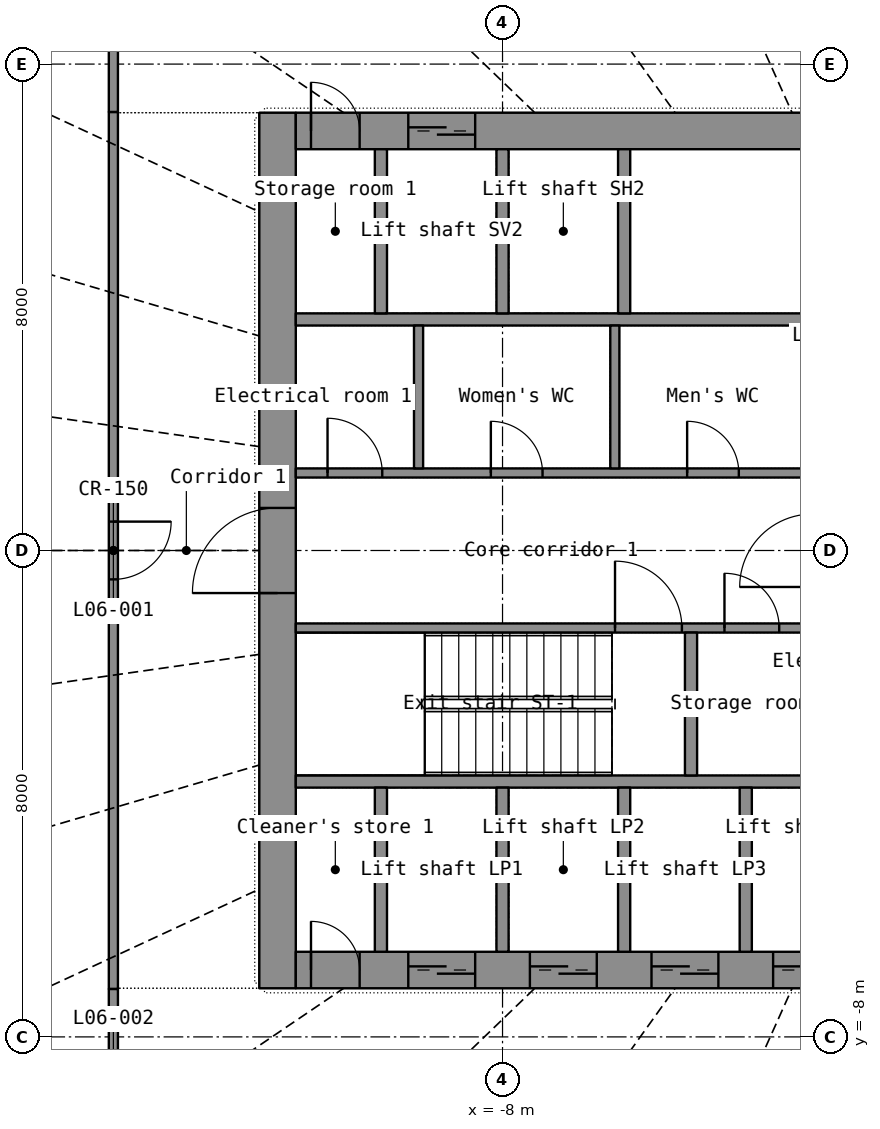
"""IFC4 building model, lengths in metres.
Left out: names, types, materials, properties, quantities, classifications, styles, units other than length and angle.
Written with IfcOpenShell. Run it as: python <this file> out.ifc"""

import sys

from ifc_helpers import new_model, si_unit, direction, frame, frame_2d, origin, place, context, subcontext, project, spatial, rectangle, extrude, element, fill, save


model = new_model("IFC4")
c1 = context("Model", 3, precision=1e-05, world=origin(), true_north=direction((0.0, 1.0)))
c2 = subcontext(c1, "Body", "Model", "MODEL_VIEW")
j1 = project(units=[si_unit("LENGTHUNIT", "METRE"), si_unit("PLANEANGLEUNIT", "RADIAN")], contexts=[c1])
p1 = place(None, origin())
s1 = spatial("IfcSite", under=j1, at=p1, CompositionType="ELEMENT")
p2 = place(p1, origin())
s2 = spatial("IfcBuilding", under=s1, at=p2, CompositionType="ELEMENT")
p3 = place(p2, frame((0.0, 0.0, 32.9)))
s3 = spatial("IfcBuildingStorey", under=s2, at=p3, CompositionType="ELEMENT", Elevation=32.9)
p4 = place(p3, frame((-11.7, -7.2, 0.0), z_axis=(0.0, 0.0, 1.0), x_axis=(0.0, 1.0, 0.0)))
e1 = element("IfcWall", 1, at=p4, inside=s3, PredefinedType="SHEAR", context=c2, shape_type="SweptSolid", body=[
    extrude(rectangle(XDim=14.4, YDim=0.6, at=frame_2d((7.2, 0.0))), origin(), (0.0, 0.0, 1.0), 3.8),
])
p5 = place(p4, frame((6.5, 0.0, 0.0)))
e2 = element("IfcOpeningElement", 2, at=p5, cuts=e1, PredefinedType="OPENING", context=c2, shape_type="SweptSolid", body=[
    extrude(rectangle(XDim=1.4, YDim=2.2, at=frame_2d((0.7, 1.1))), frame((0.0, 0.31, 0.0), z_axis=(0.0, -1.0, 0.0), x_axis=(1.0, 0.0, 0.0)), (0.0, 0.0, 1.0), 0.62),
])
p6 = place(p3, frame((-11.4, -6.9, 0.0), z_axis=(0.0, 0.0, 1.0), x_axis=(1.0, 0.0, 0.0)))
e3 = element("IfcWall", 3, at=p6, inside=s3, PredefinedType="SHEAR", context=c2, shape_type="SweptSolid", body=[
    extrude(rectangle(XDim=22.8, YDim=0.6, at=frame_2d((11.4, 0.0))), origin(), (0.0, 0.0, 1.0), 3.8),
])
p7 = place(p6, frame((1.85, 0.0, 0.0)))
e4 = element("IfcOpeningElement", 4, at=p7, cuts=e3, PredefinedType="OPENING", context=c2, shape_type="SweptSolid", body=[
    extrude(rectangle(XDim=1.1, YDim=2.2, at=frame_2d((0.55, 1.1))), frame((0.0, 0.31, 0.0), z_axis=(0.0, -1.0, 0.0), x_axis=(1.0, 0.0, 0.0)), (0.0, 0.0, 1.0), 0.62),
])
p8 = place(p6, frame((3.85, 0.0, 0.0)))
e5 = element("IfcOpeningElement", 5, at=p8, cuts=e3, PredefinedType="OPENING", context=c2, shape_type="SweptSolid", body=[
    extrude(rectangle(XDim=1.1, YDim=2.2, at=frame_2d((0.55, 1.1))), frame((0.0, 0.31, 0.0), z_axis=(0.0, -1.0, 0.0), x_axis=(1.0, 0.0, 0.0)), (0.0, 0.0, 1.0), 0.62),
])
p9 = place(p6, frame((5.85, 0.0, 0.0)))
e6 = element("IfcOpeningElement", 6, at=p9, cuts=e3, PredefinedType="OPENING", context=c2, shape_type="SweptSolid", body=[
    extrude(rectangle(XDim=1.1, YDim=2.2, at=frame_2d((0.55, 1.1))), frame((0.0, 0.31, 0.0), z_axis=(0.0, -1.0, 0.0), x_axis=(1.0, 0.0, 0.0)), (0.0, 0.0, 1.0), 0.62),
])
p10 = place(p6, frame((7.85, 0.0, 0.0)))
e7 = element("IfcOpeningElement", 7, at=p10, cuts=e3, PredefinedType="OPENING", context=c2, shape_type="SweptSolid", body=[
    extrude(rectangle(XDim=1.1, YDim=2.2, at=frame_2d((0.55, 1.1))), frame((0.0, 0.31, 0.0), z_axis=(0.0, -1.0, 0.0), x_axis=(1.0, 0.0, 0.0)), (0.0, 0.0, 1.0), 0.62),
])
p11 = place(p6, frame((9.85, 0.0, 0.0)))
e8 = element("IfcOpeningElement", 8, at=p11, cuts=e3, PredefinedType="OPENING", context=c2, shape_type="SweptSolid", body=[
    extrude(rectangle(XDim=1.1, YDim=2.2, at=frame_2d((0.55, 1.1))), frame((0.0, 0.31, 0.0), z_axis=(0.0, -1.0, 0.0), x_axis=(1.0, 0.0, 0.0)), (0.0, 0.0, 1.0), 0.62),
])
p12 = place(p6, frame((11.85, 0.0, 0.0)))
e9 = element("IfcOpeningElement", 9, at=p12, cuts=e3, PredefinedType="OPENING", context=c2, shape_type="SweptSolid", body=[
    extrude(rectangle(XDim=1.1, YDim=2.2, at=frame_2d((0.55, 1.1))), frame((0.0, 0.31, 0.0), z_axis=(0.0, -1.0, 0.0), x_axis=(1.0, 0.0, 0.0)), (0.0, 0.0, 1.0), 0.62),
])
p13 = place(p6, frame((13.85, 0.0, 0.0)))
e10 = element("IfcOpeningElement", 10, at=p13, cuts=e3, PredefinedType="OPENING", context=c2, shape_type="SweptSolid", body=[
    extrude(rectangle(XDim=1.1, YDim=2.2, at=frame_2d((0.55, 1.1))), frame((0.0, 0.31, 0.0), z_axis=(0.0, -1.0, 0.0), x_axis=(1.0, 0.0, 0.0)), (0.0, 0.0, 1.0), 0.62),
])
p14 = place(p6, frame((15.85, 0.0, 0.0)))
e11 = element("IfcOpeningElement", 11, at=p14, cuts=e3, PredefinedType="OPENING", context=c2, shape_type="SweptSolid", body=[
    extrude(rectangle(XDim=1.1, YDim=2.2, at=frame_2d((0.55, 1.1))), frame((0.0, 0.31, 0.0), z_axis=(0.0, -1.0, 0.0), x_axis=(1.0, 0.0, 0.0)), (0.0, 0.0, 1.0), 0.62),
])
p15 = place(p6, frame((19.85, 0.0, 0.0)))
e12 = element("IfcOpeningElement", 12, at=p15, cuts=e3, PredefinedType="OPENING", context=c2, shape_type="SweptSolid", body=[
    extrude(rectangle(XDim=1.1, YDim=2.2, at=frame_2d((0.55, 1.1))), frame((0.0, 0.31, 0.0), z_axis=(0.0, -1.0, 0.0), x_axis=(1.0, 0.0, 0.0)), (0.0, 0.0, 1.0), 0.62),
])
p16 = place(p6, frame((0.25, 0.0, 0.0)))
e13 = element("IfcOpeningElement", 13, at=p16, cuts=e3, PredefinedType="OPENING", context=c2, shape_type="SweptSolid", body=[
    extrude(rectangle(XDim=0.8, YDim=2.05, at=frame_2d((0.4, 1.025))), frame((0.0, 0.31, 0.0), z_axis=(0.0, -1.0, 0.0), x_axis=(1.0, 0.0, 0.0)), (0.0, 0.0, 1.0), 0.62),
])
p17 = place(p6, frame((21.75, 0.0, 0.0)))
e14 = element("IfcOpeningElement", 14, at=p17, cuts=e3, PredefinedType="OPENING", context=c2, shape_type="SweptSolid", body=[
    extrude(rectangle(XDim=0.8, YDim=2.05, at=frame_2d((0.4, 1.025))), frame((0.0, 0.31, 0.0), z_axis=(0.0, -1.0, 0.0), x_axis=(1.0, 0.0, 0.0)), (0.0, 0.0, 1.0), 0.62),
])
p18 = place(p3, frame((-11.4, 6.9, 0.0), z_axis=(0.0, 0.0, 1.0), x_axis=(1.0, 0.0, 0.0)))
e15 = element("IfcWall", 15, at=p18, inside=s3, PredefinedType="SHEAR", context=c2, shape_type="SweptSolid", body=[
    extrude(rectangle(XDim=22.8, YDim=0.6, at=frame_2d((11.4, 0.0))), origin(), (0.0, 0.0, 1.0), 3.8),
])
p19 = place(p18, frame((1.85, 0.0, 0.0)))
e16 = element("IfcOpeningElement", 16, at=p19, cuts=e15, PredefinedType="OPENING", context=c2, shape_type="SweptSolid", body=[
    extrude(rectangle(XDim=1.1, YDim=2.2, at=frame_2d((0.55, 1.1))), frame((0.0, 0.31, 0.0), z_axis=(0.0, -1.0, 0.0), x_axis=(1.0, 0.0, 0.0)), (0.0, 0.0, 1.0), 0.62),
])
p20 = place(p18, frame((8.95, 0.0, 0.0)))
e17 = element("IfcOpeningElement", 17, at=p20, cuts=e15, PredefinedType="OPENING", context=c2, shape_type="SweptSolid", body=[
    extrude(rectangle(XDim=0.9, YDim=2.1, at=frame_2d((0.45, 1.05))), frame((0.0, 0.31, 0.0), z_axis=(0.0, -1.0, 0.0), x_axis=(1.0, 0.0, 0.0)), (0.0, 0.0, 1.0), 0.62),
])
p21 = place(p18, frame((16.95, 0.0, 0.0)))
e18 = element("IfcOpeningElement", 18, at=p21, cuts=e15, PredefinedType="OPENING", context=c2, shape_type="SweptSolid", body=[
    extrude(rectangle(XDim=0.9, YDim=2.1, at=frame_2d((0.45, 1.05))), frame((0.0, 0.31, 0.0), z_axis=(0.0, -1.0, 0.0), x_axis=(1.0, 0.0, 0.0)), (0.0, 0.0, 1.0), 0.62),
])
p22 = place(p18, frame((0.25, 0.0, 0.0)))
e19 = element("IfcOpeningElement", 19, at=p22, cuts=e15, PredefinedType="OPENING", context=c2, shape_type="SweptSolid", body=[
    extrude(rectangle(XDim=0.8, YDim=2.05, at=frame_2d((0.4, 1.025))), frame((0.0, 0.31, 0.0), z_axis=(0.0, -1.0, 0.0), x_axis=(1.0, 0.0, 0.0)), (0.0, 0.0, 1.0), 0.62),
])
p23 = place(p18, frame((21.75, 0.0, 0.0)))
e20 = element("IfcOpeningElement", 20, at=p23, cuts=e15, PredefinedType="OPENING", context=c2, shape_type="SweptSolid", body=[
    extrude(rectangle(XDim=0.8, YDim=2.05, at=frame_2d((0.4, 1.025))), frame((0.0, 0.31, 0.0), z_axis=(0.0, -1.0, 0.0), x_axis=(1.0, 0.0, 0.0)), (0.0, 0.0, 1.0), 0.62),
])
for number, where, z_axis, x_axis in (
    (21, (-11.4, -3.8, 0.0), (0.0, 0.0, 1.0), (1.0, 0.0, 0.0)),
    (22, (-11.4, 3.8, 0.0), (0.0, 0.0, 1.0), (1.0, 0.0, 0.0)),
):
    element("IfcWall", number, at=place(p3, frame(where, z_axis=z_axis, x_axis=x_axis)), inside=s3, PredefinedType="SHEAR", context=c2, shape_type="SweptSolid", body=[
        extrude(rectangle(XDim=22.8, YDim=0.2, at=frame_2d((11.4, 0.0))), origin(), (0.0, 0.0, 1.0), 3.8),
    ])
for number, where, z_axis, x_axis in (
    (23, (-10.0, -6.6, 0.0), (0.0, 0.0, 1.0), (0.0, 1.0, 0.0)),
    (24, (-8.0, -6.6, 0.0), (0.0, 0.0, 1.0), (0.0, 1.0, 0.0)),
    (25, (-6.0, -6.6, 0.0), (0.0, 0.0, 1.0), (0.0, 1.0, 0.0)),
    (26, (-4.0, -6.6, 0.0), (0.0, 0.0, 1.0), (0.0, 1.0, 0.0)),
    (27, (-10.0, 3.9, 0.0), (0.0, 0.0, 1.0), (0.0, 1.0, 0.0)),
    (28, (-8.0, 3.9, 0.0), (0.0, 0.0, 1.0), (0.0, 1.0, 0.0)),
    (29, (-6.0, 3.9, 0.0), (0.0, 0.0, 1.0), (0.0, 1.0, 0.0)),
):
    element("IfcWall", number, at=place(p3, frame(where, z_axis=z_axis, x_axis=x_axis)), inside=s3, PredefinedType="SHEAR", context=c2, shape_type="SweptSolid", body=[
        extrude(rectangle(XDim=2.7, YDim=0.2, at=frame_2d((1.35, 0.0))), origin(), (0.0, 0.0, 1.0), 3.8),
    ])
p24 = place(p3, frame((-11.4, -1.275, 0.0), z_axis=(0.0, 0.0, 1.0), x_axis=(1.0, 0.0, 0.0)))
e30 = element("IfcWall", 30, at=p24, inside=s3, PredefinedType="SHEAR", context=c2, shape_type="SweptSolid", body=[
    extrude(rectangle(XDim=8.4, YDim=0.15, at=frame_2d((4.2, 0.0))), origin(), (0.0, 0.0, 1.0), 3.8),
])
p25 = place(p24, frame((5.25, 0.0, 0.0)))
e31 = element("IfcOpeningElement", 31, at=p25, cuts=e30, PredefinedType="OPENING", context=c2, shape_type="SweptSolid", body=[
    extrude(rectangle(XDim=1.1, YDim=2.15, at=frame_2d((0.55, 1.075))), frame((0.0, 0.085, 0.0), z_axis=(0.0, -1.0, 0.0), x_axis=(1.0, 0.0, 0.0)), (0.0, 0.0, 1.0), 0.17),
])
p26 = place(p24, frame((7.05, 0.0, 0.0)))
e32 = element("IfcOpeningElement", 32, at=p26, cuts=e30, PredefinedType="OPENING", context=c2, shape_type="SweptSolid", body=[
    extrude(rectangle(XDim=0.9, YDim=2.1, at=frame_2d((0.45, 1.05))), frame((0.0, 0.085, 0.0), z_axis=(0.0, -1.0, 0.0), x_axis=(1.0, 0.0, 0.0)), (0.0, 0.0, 1.0), 0.17),
])
p27 = place(p3, frame((-11.4, 1.275, 0.0), z_axis=(0.0, 0.0, 1.0), x_axis=(1.0, 0.0, 0.0)))
e33 = element("IfcWall", 33, at=p27, inside=s3, PredefinedType="PARTITIONING", context=c2, shape_type="SweptSolid", body=[
    extrude(rectangle(XDim=8.4, YDim=0.15, at=frame_2d((4.2, 0.0))), origin(), (0.0, 0.0, 1.0), 3.8),
])
p28 = place(p27, frame((0.522, 0.0, 0.0)))
e34 = element("IfcOpeningElement", 34, at=p28, cuts=e33, PredefinedType="OPENING", context=c2, shape_type="SweptSolid", body=[
    extrude(rectangle(XDim=0.9, YDim=2.1, at=frame_2d((0.45, 1.05))), frame((0.0, 0.085, 0.0), z_axis=(0.0, -1.0, 0.0), x_axis=(1.0, 0.0, 0.0)), (0.0, 0.0, 1.0), 0.17),
])
p29 = place(p27, frame((3.208, 0.0, 0.0)))
e35 = element("IfcOpeningElement", 35, at=p29, cuts=e33, PredefinedType="OPENING", context=c2, shape_type="SweptSolid", body=[
    extrude(rectangle(XDim=0.85, YDim=2.1, at=frame_2d((0.425, 1.05))), frame((0.0, 0.085, 0.0), z_axis=(0.0, -1.0, 0.0), x_axis=(1.0, 0.0, 0.0)), (0.0, 0.0, 1.0), 0.17),
])
p30 = place(p27, frame((6.436, 0.0, 0.0)))
e36 = element("IfcOpeningElement", 36, at=p30, cuts=e33, PredefinedType="OPENING", context=c2, shape_type="SweptSolid", body=[
    extrude(rectangle(XDim=0.85, YDim=2.1, at=frame_2d((0.425, 1.05))), frame((0.0, 0.085, 0.0), z_axis=(0.0, -1.0, 0.0), x_axis=(1.0, 0.0, 0.0)), (0.0, 0.0, 1.0), 0.17),
])
p31 = place(p3, frame((-4.9, -3.7, 0.0), z_axis=(0.0, 0.0, 1.0), x_axis=(0.0, 1.0, 0.0)))
e37 = element("IfcWall", 37, at=p31, inside=s3, PredefinedType="SHEAR", context=c2, shape_type="SweptSolid", body=[
    extrude(rectangle(XDim=2.35, YDim=0.2, at=frame_2d((1.175, 0.0))), origin(), (0.0, 0.0, 1.0), 3.8),
])
for number, where, z_axis, x_axis in (
    (38, (-9.381, 1.35, 0.0), (0.0, 0.0, 1.0), (0.0, 1.0, 0.0)),
    (39, (-6.153, 1.35, 0.0), (0.0, 0.0, 1.0), (0.0, 1.0, 0.0)),
):
    element("IfcWall", number, at=place(p3, frame(where, z_axis=z_axis, x_axis=x_axis)), inside=s3, PredefinedType="PARTITIONING", context=c2, shape_type="SweptSolid", body=[
        extrude(rectangle(XDim=2.35, YDim=0.15, at=frame_2d((1.175, 0.0))), origin(), (0.0, 0.0, 1.0), 3.8),
    ])
p32 = place(p3, frame((-14.4, 7.212, 0.0), z_axis=(0.0, 0.0, 1.0), x_axis=(0.0, -1.0, 0.0)))
e40 = element("IfcWall", 40, at=p32, inside=s3, PredefinedType="PARTITIONING", context=c2, shape_type="SweptSolid", body=[
    extrude(rectangle(XDim=14.424, YDim=0.15, at=frame_2d((7.212, 0.0))), origin(), (0.0, 0.0, 1.0), 2.8),
])
p33 = place(p32, frame((6.737, 0.0, 0.0)))
e41 = element("IfcOpeningElement", 41, at=p33, cuts=e40, PredefinedType="OPENING", context=c2, shape_type="SweptSolid", body=[
    extrude(rectangle(XDim=0.95, YDim=2.15, at=frame_2d((0.475, 1.075))), frame((0.0, 0.085, 0.0), z_axis=(0.0, -1.0, 0.0), x_axis=(1.0, 0.0, 0.0)), (0.0, 0.0, 1.0), 0.17),
])
p34 = place(p3, frame((-14.4, -7.213, 0.0), z_axis=(0.0, 0.0, 1.0), x_axis=(0.0, -1.0, 0.0)))
e42 = element("IfcWall", 42, at=p34, inside=s3, PredefinedType="PARTITIONING", context=c2, shape_type="SweptSolid", body=[
    extrude(rectangle(XDim=2.986, YDim=0.15, at=frame_2d((1.493, 0.0))), origin(), (0.0, 0.0, 1.0), 2.8),
])
p35 = place(p34, frame((1.018, 0.0, 0.0)))
e43 = element("IfcOpeningElement", 43, at=p35, cuts=e42, PredefinedType="OPENING", context=c2, shape_type="SweptSolid", body=[
    extrude(rectangle(XDim=0.95, YDim=2.15, at=frame_2d((0.475, 1.075))), frame((0.0, 0.085, 0.0), z_axis=(0.0, -1.0, 0.0), x_axis=(1.0, 0.0, 0.0)), (0.0, 0.0, 1.0), 0.17),
])
p36 = place(p3, frame((-14.4, 10.199, 0.0), z_axis=(0.0, 0.0, 1.0), x_axis=(0.0, -1.0, 0.0)))
e44 = element("IfcWall", 44, at=p36, inside=s3, PredefinedType="PARTITIONING", context=c2, shape_type="SweptSolid", body=[
    extrude(rectangle(XDim=2.986, YDim=0.15, at=frame_2d((1.493, 0.0))), origin(), (0.0, 0.0, 1.0), 2.8),
])
p37 = place(p7, origin())
e45 = element("IfcDoor", 45, at=p37, inside=s3, OperationType="DOUBLE_DOOR_SLIDING", PredefinedType="DOOR", context=c2, shape_type="SweptSolid", body=[
    extrude(rectangle(XDim=1.1, YDim=2.2, at=frame_2d((0.55, 1.1))), frame((0.0, 0.025, 0.0), z_axis=(0.0, -1.0, 0.0), x_axis=(1.0, 0.0, 0.0)), (0.0, 0.0, 1.0), 0.05),
])
fill(e4, e45)
p38 = place(p8, origin())
e46 = element("IfcDoor", 46, at=p38, inside=s3, OperationType="DOUBLE_DOOR_SLIDING", PredefinedType="DOOR", context=c2, shape_type="SweptSolid", body=[
    extrude(rectangle(XDim=1.1, YDim=2.2, at=frame_2d((0.55, 1.1))), frame((0.0, 0.025, 0.0), z_axis=(0.0, -1.0, 0.0), x_axis=(1.0, 0.0, 0.0)), (0.0, 0.0, 1.0), 0.05),
])
fill(e5, e46)
p39 = place(p9, origin())
e47 = element("IfcDoor", 47, at=p39, inside=s3, OperationType="DOUBLE_DOOR_SLIDING", PredefinedType="DOOR", context=c2, shape_type="SweptSolid", body=[
    extrude(rectangle(XDim=1.1, YDim=2.2, at=frame_2d((0.55, 1.1))), frame((0.0, 0.025, 0.0), z_axis=(0.0, -1.0, 0.0), x_axis=(1.0, 0.0, 0.0)), (0.0, 0.0, 1.0), 0.05),
])
fill(e6, e47)
p40 = place(p10, origin())
e48 = element("IfcDoor", 48, at=p40, inside=s3, OperationType="DOUBLE_DOOR_SLIDING", PredefinedType="DOOR", context=c2, shape_type="SweptSolid", body=[
    extrude(rectangle(XDim=1.1, YDim=2.2, at=frame_2d((0.55, 1.1))), frame((0.0, 0.025, 0.0), z_axis=(0.0, -1.0, 0.0), x_axis=(1.0, 0.0, 0.0)), (0.0, 0.0, 1.0), 0.05),
])
fill(e7, e48)
p41 = place(p16, origin())
e49 = element("IfcDoor", 49, at=p41, inside=s3, OperationType="SINGLE_SWING_LEFT", PredefinedType="DOOR", context=c2, shape_type="SweptSolid", body=[
    extrude(rectangle(XDim=0.8, YDim=2.05, at=frame_2d((0.4, 1.025))), frame((0.0, 0.025, 0.0), z_axis=(0.0, -1.0, 0.0), x_axis=(1.0, 0.0, 0.0)), (0.0, 0.0, 1.0), 0.05),
])
fill(e13, e49)
p42 = place(p19, origin())
e50 = element("IfcDoor", 50, at=p42, inside=s3, OperationType="DOUBLE_DOOR_SLIDING", PredefinedType="DOOR", context=c2, shape_type="SweptSolid", body=[
    extrude(rectangle(XDim=1.1, YDim=2.2, at=frame_2d((0.55, 1.1))), frame((0.0, 0.025, 0.0), z_axis=(0.0, -1.0, 0.0), x_axis=(1.0, 0.0, 0.0)), (0.0, 0.0, 1.0), 0.05),
])
fill(e16, e50)
p43 = place(p22, origin())
e51 = element("IfcDoor", 51, at=p43, inside=s3, OperationType="SINGLE_SWING_LEFT", PredefinedType="DOOR", context=c2, shape_type="SweptSolid", body=[
    extrude(rectangle(XDim=0.8, YDim=2.05, at=frame_2d((0.4, 1.025))), frame((0.0, 0.025, 0.0), z_axis=(0.0, -1.0, 0.0), x_axis=(1.0, 0.0, 0.0)), (0.0, 0.0, 1.0), 0.05),
])
fill(e19, e51)
p44 = place(p5, origin())
e52 = element("IfcDoor", 52, at=p44, inside=s3, OperationType="DOUBLE_DOOR_SINGLE_SWING", PredefinedType="DOOR", context=c2, shape_type="SweptSolid", body=[
    extrude(rectangle(XDim=1.4, YDim=2.2, at=frame_2d((0.7, 1.1))), frame((0.0, 0.025, 0.0), z_axis=(0.0, -1.0, 0.0), x_axis=(1.0, 0.0, 0.0)), (0.0, 0.0, 1.0), 0.05),
])
fill(e2, e52)
p45 = place(p25, origin())
e53 = element("IfcDoor", 53, at=p45, inside=s3, OperationType="SINGLE_SWING_LEFT", PredefinedType="DOOR", context=c2, shape_type="SweptSolid", body=[
    extrude(rectangle(XDim=1.1, YDim=2.15, at=frame_2d((0.55, 1.075))), frame((0.0, 0.025, 0.0), z_axis=(0.0, -1.0, 0.0), x_axis=(1.0, 0.0, 0.0)), (0.0, 0.0, 1.0), 0.05),
])
fill(e31, e53)
p46 = place(p28, origin())
e54 = element("IfcDoor", 54, at=p46, inside=s3, OperationType="SINGLE_SWING_LEFT", PredefinedType="DOOR", context=c2, shape_type="SweptSolid", body=[
    extrude(rectangle(XDim=0.9, YDim=2.1, at=frame_2d((0.45, 1.05))), frame((0.0, 0.025, 0.0), z_axis=(0.0, -1.0, 0.0), x_axis=(1.0, 0.0, 0.0)), (0.0, 0.0, 1.0), 0.05),
])
fill(e34, e54)
p47 = place(p29, origin())
e55 = element("IfcDoor", 55, at=p47, inside=s3, OperationType="SINGLE_SWING_LEFT", PredefinedType="DOOR", context=c2, shape_type="SweptSolid", body=[
    extrude(rectangle(XDim=0.85, YDim=2.1, at=frame_2d((0.425, 1.05))), frame((0.0, 0.025, 0.0), z_axis=(0.0, -1.0, 0.0), x_axis=(1.0, 0.0, 0.0)), (0.0, 0.0, 1.0), 0.05),
])
fill(e35, e55)
p48 = place(p30, origin())
e56 = element("IfcDoor", 56, at=p48, inside=s3, OperationType="SINGLE_SWING_LEFT", PredefinedType="DOOR", context=c2, shape_type="SweptSolid", body=[
    extrude(rectangle(XDim=0.85, YDim=2.1, at=frame_2d((0.425, 1.05))), frame((0.0, 0.025, 0.0), z_axis=(0.0, -1.0, 0.0), x_axis=(1.0, 0.0, 0.0)), (0.0, 0.0, 1.0), 0.05),
])
fill(e36, e56)
p49 = place(p26, origin())
e57 = element("IfcDoor", 57, at=p49, inside=s3, OperationType="SINGLE_SWING_LEFT", PredefinedType="DOOR", context=c2, shape_type="SweptSolid", body=[
    extrude(rectangle(XDim=0.9, YDim=2.1, at=frame_2d((0.45, 1.05))), frame((0.0, 0.025, 0.0), z_axis=(0.0, -1.0, 0.0), x_axis=(1.0, 0.0, 0.0)), (0.0, 0.0, 1.0), 0.05),
])
fill(e32, e57)
p50 = place(p33, origin())
e58 = element("IfcDoor", 58, at=p50, inside=s3, OperationType="SINGLE_SWING_LEFT", PredefinedType="DOOR", context=c2, shape_type="SweptSolid", body=[
    extrude(rectangle(XDim=0.95, YDim=2.15, at=frame_2d((0.475, 1.075))), frame((0.0, 0.025, 0.0), z_axis=(0.0, -1.0, 0.0), x_axis=(1.0, 0.0, 0.0)), (0.0, 0.0, 1.0), 0.05),
])
fill(e41, e58)
save(model, sys.argv[1])
